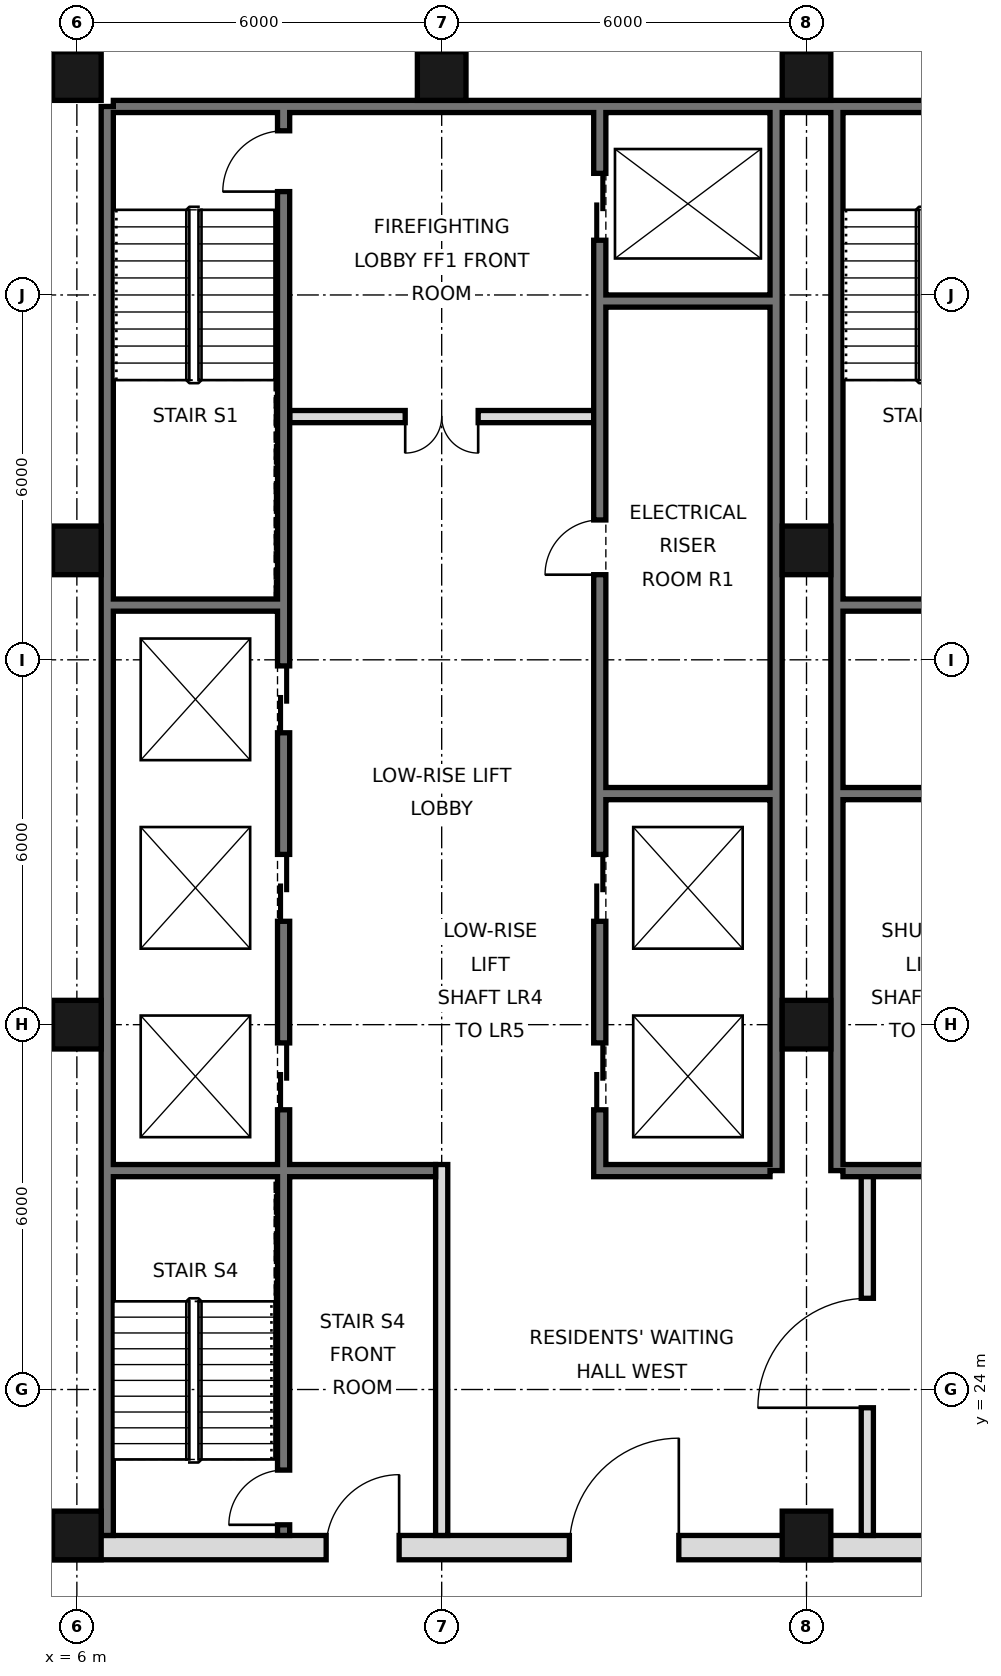
"""IFC4 building model, lengths in metres.
Left out: names, types, materials, properties, quantities, classifications, styles, units other than length and angle.
Written with IfcOpenShell. Run it as: python <this file> out.ifc"""

import sys

from ifc_helpers import new_model, si_unit, direction, frame, frame_2d, origin, origin_2d, place, context, subcontext, project, spatial, rectangle, hollow_rectangle, extrude, element, fill, save


model = new_model("IFC4")
c1 = context("Model", 3, precision=1e-05, world=origin(), true_north=direction((0.0, 1.0)))
c2 = subcontext(c1, "Body", "Model", "MODEL_VIEW")
j1 = project(units=[si_unit("LENGTHUNIT", "METRE"), si_unit("PLANEANGLEUNIT", "RADIAN")], contexts=[c1])
p1 = place(None, origin())
s1 = spatial("IfcSite", under=j1, at=p1, CompositionType="ELEMENT")
p2 = place(p1, origin())
s2 = spatial("IfcBuilding", under=s1, at=p2, CompositionType="ELEMENT")
p3 = place(p2, frame((0.0, 0.0, 99.8)))
s3 = spatial("IfcBuildingStorey", under=s2, at=p3, CompositionType="ELEMENT", Elevation=99.8)
for number, where, z_axis, x_axis in (
    (1, (6.0, 21.6, 0.0), (0.0, 0.0, 1.0), (1.0, 0.0, 0.0)),
    (2, (6.0, 30.0, 0.0), (0.0, 0.0, 1.0), (1.0, 0.0, 0.0)),
    (3, (6.0, 37.8, 0.0), (0.0, 0.0, 1.0), (1.0, 0.0, 0.0)),
    (4, (6.0, 45.6, 0.0), (0.0, 0.0, 1.0), (1.0, 0.0, 0.0)),
    (5, (12.0, 45.6, 0.0), (0.0, 0.0, 1.0), (1.0, 0.0, 0.0)),
    (6, (18.0, 21.6, 0.0), (0.0, 0.0, 1.0), (1.0, 0.0, 0.0)),
    (7, (18.0, 30.0, 0.0), (0.0, 0.0, 1.0), (1.0, 0.0, 0.0)),
    (8, (18.0, 37.8, 0.0), (0.0, 0.0, 1.0), (1.0, 0.0, 0.0)),
    (9, (18.0, 45.6, 0.0), (0.0, 0.0, 1.0), (1.0, 0.0, 0.0)),
):
    element("IfcColumn", number, at=place(p3, frame(where, z_axis=z_axis, x_axis=x_axis)), inside=s3, PredefinedType="COLUMN", context=c2, shape_type="SweptSolid", body=[
        extrude(hollow_rectangle(XDim=0.8, YDim=0.8, WallThickness=0.05, at=origin_2d()), origin(), (0.0, 0.0, 1.0), 3.6),
    ])
p4 = place(p3, frame((6.5, 21.6, 0.0), z_axis=(0.0, 0.0, 1.0), x_axis=(0.0, 1.0, 0.0)))
e10 = element("IfcWall", 10, at=p4, inside=s3, PredefinedType="SOLIDWALL", context=c2, shape_type="SweptSolid", body=[
    extrude(rectangle(XDim=23.5, YDim=0.2, at=frame_2d((11.75, 0.0))), origin(), (0.0, 0.0, 1.0), 3.42),
])
p5 = place(p3, frame((6.6, 45.1, 0.0), z_axis=(0.0, 0.0, 1.0), x_axis=(1.0, 0.0, 0.0)))
e11 = element("IfcWall", 11, at=p5, inside=s3, PredefinedType="SOLIDWALL", context=c2, shape_type="SweptSolid", body=[
    extrude(rectangle(XDim=34.8, YDim=0.2, at=frame_2d((17.4, 0.0))), origin(), (0.0, 0.0, 1.0), 3.42),
])
for number, where, z_axis, x_axis in (
    (12, (17.5, 27.6, 0.0), (0.0, 0.0, 1.0), (0.0, 1.0, 0.0)),
    (13, (18.5, 27.6, 0.0), (0.0, 0.0, 1.0), (0.0, 1.0, 0.0)),
):
    element("IfcWall", number, at=place(p3, frame(where, z_axis=z_axis, x_axis=x_axis)), inside=s3, PredefinedType="SOLIDWALL", context=c2, shape_type="SweptSolid", body=[
        extrude(rectangle(XDim=17.5, YDim=0.2, at=frame_2d((8.75, 0.0))), origin(), (0.0, 0.0, 1.0), 3.42),
    ])
p6 = place(p3, frame((5.6, 21.4, 0.0), z_axis=(0.0, 0.0, 1.0), x_axis=(1.0, 0.0, 0.0)))
e14 = element("IfcWall", 14, at=p6, inside=s3, PredefinedType="SOLIDWALL", context=c2, shape_type="SweptSolid", body=[
    extrude(rectangle(XDim=36.8, YDim=0.4, at=frame_2d((18.4, 0.0))), origin(), (0.0, 0.0, 1.0), 3.42),
])
p7 = place(p6, frame((8.5, 0.0, 0.0)))
e15 = element("IfcOpeningElement", 15, at=p7, cuts=e14, PredefinedType="OPENING", context=c2, shape_type="SweptSolid", body=[
    extrude(rectangle(XDim=1.8, YDim=2.1, at=frame_2d((0.9, 1.05))), frame((0.0, 0.21, 0.0), z_axis=(0.0, -1.0, 0.0), x_axis=(1.0, 0.0, 0.0)), (0.0, 0.0, 1.0), 0.42),
])
p8 = place(p6, frame((17.5, 0.0, 0.0)))
e16 = element("IfcOpeningElement", 16, at=p8, cuts=e14, PredefinedType="OPENING", context=c2, shape_type="SweptSolid", body=[
    extrude(rectangle(XDim=1.8, YDim=2.1, at=frame_2d((0.9, 1.05))), frame((0.0, 0.21, 0.0), z_axis=(0.0, -1.0, 0.0), x_axis=(1.0, 0.0, 0.0)), (0.0, 0.0, 1.0), 0.42),
])
p9 = place(p6, frame((26.5, 0.0, 0.0)))
e17 = element("IfcOpeningElement", 17, at=p9, cuts=e14, PredefinedType="OPENING", context=c2, shape_type="SweptSolid", body=[
    extrude(rectangle(XDim=1.8, YDim=2.1, at=frame_2d((0.9, 1.05))), frame((0.0, 0.21, 0.0), z_axis=(0.0, -1.0, 0.0), x_axis=(1.0, 0.0, 0.0)), (0.0, 0.0, 1.0), 0.42),
])
p10 = place(p6, frame((4.5, 0.0, 0.0)))
e18 = element("IfcOpeningElement", 18, at=p10, cuts=e14, PredefinedType="OPENING", context=c2, shape_type="SweptSolid", body=[
    extrude(rectangle(XDim=1.2, YDim=2.1, at=frame_2d((0.6, 1.05))), frame((0.0, 0.21, 0.0), z_axis=(0.0, -1.0, 0.0), x_axis=(1.0, 0.0, 0.0)), (0.0, 0.0, 1.0), 0.42),
])
p11 = place(p6, frame((31.1, 0.0, 0.0)))
e19 = element("IfcOpeningElement", 19, at=p11, cuts=e14, PredefinedType="OPENING", context=c2, shape_type="SweptSolid", body=[
    extrude(rectangle(XDim=1.2, YDim=2.1, at=frame_2d((0.6, 1.05))), frame((0.0, 0.21, 0.0), z_axis=(0.0, -1.0, 0.0), x_axis=(1.0, 0.0, 0.0)), (0.0, 0.0, 1.0), 0.42),
])
p12 = place(p3, frame((19.0, 21.6, 0.0), z_axis=(0.0, 0.0, 1.0), x_axis=(0.0, 1.0, 0.0)))
e20 = element("IfcWall", 20, at=p12, inside=s3, PredefinedType="PARTITIONING", context=c2, shape_type="SweptSolid", body=[
    extrude(rectangle(XDim=6.0, YDim=0.2, at=frame_2d((3.0, 0.0))), origin(), (0.0, 0.0, 1.0), 3.42),
])
p13 = place(p12, frame((2.1, 0.0, 0.0)))
e21 = element("IfcOpeningElement", 21, at=p13, cuts=e20, PredefinedType="OPENING", context=c2, shape_type="SweptSolid", body=[
    extrude(rectangle(XDim=1.8, YDim=2.1, at=frame_2d((0.9, 1.05))), frame((0.0, 0.11, 0.0), z_axis=(0.0, -1.0, 0.0), x_axis=(1.0, 0.0, 0.0)), (0.0, 0.0, 1.0), 0.22),
])
p14 = place(p3, frame((12.0, 21.6, 0.0), z_axis=(0.0, 0.0, 1.0), x_axis=(0.0, 1.0, 0.0)))
e22 = element("IfcWall", 22, at=p14, inside=s3, PredefinedType="PARTITIONING", context=c2, shape_type="SweptSolid", body=[
    extrude(rectangle(XDim=6.1, YDim=0.2, at=frame_2d((3.05, 0.0))), origin(), (0.0, 0.0, 1.0), 3.42),
])
p15 = place(p3, frame((14.6, 27.5, 0.0), z_axis=(0.0, 0.0, 1.0), x_axis=(0.0, 1.0, 0.0)))
e23 = element("IfcWall", 23, at=p15, inside=s3, PredefinedType="SOLIDWALL", context=c2, shape_type="SweptSolid", body=[
    extrude(rectangle(XDim=17.5, YDim=0.2, at=frame_2d((8.75, 0.0))), origin(), (0.0, 0.0, 1.0), 3.42),
])
p16 = place(p15, frame((1.1, 0.0, 0.0)))
e24 = element("IfcOpeningElement", 24, at=p16, cuts=e23, PredefinedType="OPENING", context=c2, shape_type="SweptSolid", body=[
    extrude(rectangle(XDim=1.1, YDim=2.1, at=frame_2d((0.55, 1.05))), frame((0.0, 0.11, 0.0), z_axis=(0.0, -1.0, 0.0), x_axis=(1.0, 0.0, 0.0)), (0.0, 0.0, 1.0), 0.22),
])
p17 = place(p15, frame((4.2, 0.0, 0.0)))
e25 = element("IfcOpeningElement", 25, at=p17, cuts=e23, PredefinedType="OPENING", context=c2, shape_type="SweptSolid", body=[
    extrude(rectangle(XDim=1.1, YDim=2.1, at=frame_2d((0.55, 1.05))), frame((0.0, 0.11, 0.0), z_axis=(0.0, -1.0, 0.0), x_axis=(1.0, 0.0, 0.0)), (0.0, 0.0, 1.0), 0.22),
])
p18 = place(p15, frame((15.4, 0.0, 0.0)))
e26 = element("IfcOpeningElement", 26, at=p18, cuts=e23, PredefinedType="OPENING", context=c2, shape_type="SweptSolid", body=[
    extrude(rectangle(XDim=1.1, YDim=2.1, at=frame_2d((0.55, 1.05))), frame((0.0, 0.11, 0.0), z_axis=(0.0, -1.0, 0.0), x_axis=(1.0, 0.0, 0.0)), (0.0, 0.0, 1.0), 0.22),
])
p19 = place(p15, frame((9.9, 0.0, 0.0)))
e27 = element("IfcOpeningElement", 27, at=p19, cuts=e23, PredefinedType="OPENING", context=c2, shape_type="SweptSolid", body=[
    extrude(rectangle(XDim=0.9, YDim=2.1, at=frame_2d((0.45, 1.05))), frame((0.0, 0.11, 0.0), z_axis=(0.0, -1.0, 0.0), x_axis=(1.0, 0.0, 0.0)), (0.0, 0.0, 1.0), 0.22),
])
p20 = place(p3, frame((9.4, 21.6, 0.0), z_axis=(0.0, 0.0, 1.0), x_axis=(0.0, 1.0, 0.0)))
e28 = element("IfcWall", 28, at=p20, inside=s3, PredefinedType="SOLIDWALL", context=c2, shape_type="SweptSolid", body=[
    extrude(rectangle(XDim=23.4, YDim=0.2, at=frame_2d((11.7, 0.0))), origin(), (0.0, 0.0, 1.0), 3.42),
])
p21 = place(p20, frame((7.0, 0.0, 0.0)))
e29 = element("IfcOpeningElement", 29, at=p21, cuts=e28, PredefinedType="OPENING", context=c2, shape_type="SweptSolid", body=[
    extrude(rectangle(XDim=1.1, YDim=2.1, at=frame_2d((0.55, 1.05))), frame((0.0, 0.11, 0.0), z_axis=(0.0, -1.0, 0.0), x_axis=(1.0, 0.0, 0.0)), (0.0, 0.0, 1.0), 0.22),
])
p22 = place(p20, frame((10.1, 0.0, 0.0)))
e30 = element("IfcOpeningElement", 30, at=p22, cuts=e28, PredefinedType="OPENING", context=c2, shape_type="SweptSolid", body=[
    extrude(rectangle(XDim=1.1, YDim=2.1, at=frame_2d((0.55, 1.05))), frame((0.0, 0.11, 0.0), z_axis=(0.0, -1.0, 0.0), x_axis=(1.0, 0.0, 0.0)), (0.0, 0.0, 1.0), 0.22),
])
p23 = place(p20, frame((13.2, 0.0, 0.0)))
e31 = element("IfcOpeningElement", 31, at=p23, cuts=e28, PredefinedType="OPENING", context=c2, shape_type="SweptSolid", body=[
    extrude(rectangle(XDim=1.1, YDim=2.1, at=frame_2d((0.55, 1.05))), frame((0.0, 0.11, 0.0), z_axis=(0.0, -1.0, 0.0), x_axis=(1.0, 0.0, 0.0)), (0.0, 0.0, 1.0), 0.22),
])
p24 = place(p20, frame((22.1, 0.0, 0.0)))
e32 = element("IfcOpeningElement", 32, at=p24, cuts=e28, PredefinedType="OPENING", context=c2, shape_type="SweptSolid", body=[
    extrude(rectangle(XDim=1.0, YDim=2.1, at=frame_2d((0.5, 1.05))), frame((0.0, 0.11, 0.0), z_axis=(0.0, -1.0, 0.0), x_axis=(1.0, 0.0, 0.0)), (0.0, 0.0, 1.0), 0.22),
])
p25 = place(p20, frame((0.175, 0.0, 0.0)))
e33 = element("IfcOpeningElement", 33, at=p25, cuts=e28, PredefinedType="OPENING", context=c2, shape_type="SweptSolid", body=[
    extrude(rectangle(XDim=0.9, YDim=2.1, at=frame_2d((0.45, 1.05))), frame((0.0, 0.11, 0.0), z_axis=(0.0, -1.0, 0.0), x_axis=(1.0, 0.0, 0.0)), (0.0, 0.0, 1.0), 0.22),
])
for number, where, z_axis, x_axis in (
    (34, (14.7, 27.6, 0.0), (0.0, 0.0, 1.0), (1.0, 0.0, 0.0)),
    (35, (18.6, 27.6, 0.0), (0.0, 0.0, 1.0), (1.0, 0.0, 0.0)),
):
    element("IfcWall", number, at=place(p3, frame(where, z_axis=z_axis, x_axis=x_axis)), inside=s3, PredefinedType="SOLIDWALL", context=c2, shape_type="SweptSolid", body=[
        extrude(rectangle(XDim=2.7, YDim=0.2, at=frame_2d((1.35, 0.0))), origin(), (0.0, 0.0, 1.0), 3.42),
    ])
p26 = place(p3, frame((6.6, 27.6, 0.0), z_axis=(0.0, 0.0, 1.0), x_axis=(1.0, 0.0, 0.0)))
e36 = element("IfcWall", 36, at=p26, inside=s3, PredefinedType="SOLIDWALL", context=c2, shape_type="SweptSolid", body=[
    extrude(rectangle(XDim=5.3, YDim=0.2, at=frame_2d((2.65, 0.0))), origin(), (0.0, 0.0, 1.0), 3.42),
])
for number, where, z_axis, x_axis in (
    (37, (14.7, 33.8, 0.0), (0.0, 0.0, 1.0), (1.0, 0.0, 0.0)),
    (38, (18.6, 33.8, 0.0), (0.0, 0.0, 1.0), (1.0, 0.0, 0.0)),
    (39, (18.6, 36.9, 0.0), (0.0, 0.0, 1.0), (1.0, 0.0, 0.0)),
    (40, (6.6, 36.9, 0.0), (0.0, 0.0, 1.0), (1.0, 0.0, 0.0)),
):
    element("IfcWall", number, at=place(p3, frame(where, z_axis=z_axis, x_axis=x_axis)), inside=s3, PredefinedType="SOLIDWALL", context=c2, shape_type="SweptSolid", body=[
        extrude(rectangle(XDim=2.7, YDim=0.2, at=frame_2d((1.35, 0.0))), origin(), (0.0, 0.0, 1.0), 3.42),
    ])
p27 = place(p3, frame((9.5, 40.0, 0.0), z_axis=(0.0, 0.0, 1.0), x_axis=(1.0, 0.0, 0.0)))
e41 = element("IfcWall", 41, at=p27, inside=s3, PredefinedType="PARTITIONING", context=c2, shape_type="SweptSolid", body=[
    extrude(rectangle(XDim=5.0, YDim=0.2, at=frame_2d((2.5, 0.0))), origin(), (0.0, 0.0, 1.0), 3.42),
])
p28 = place(p27, frame((1.9, 0.0, 0.0)))
e42 = element("IfcOpeningElement", 42, at=p28, cuts=e41, PredefinedType="OPENING", context=c2, shape_type="SweptSolid", body=[
    extrude(rectangle(XDim=1.2, YDim=2.1, at=frame_2d((0.6, 1.05))), frame((0.0, 0.11, 0.0), z_axis=(0.0, -1.0, 0.0), x_axis=(1.0, 0.0, 0.0)), (0.0, 0.0, 1.0), 0.22),
])
p29 = place(p3, frame((14.7, 41.9, 0.0), z_axis=(0.0, 0.0, 1.0), x_axis=(1.0, 0.0, 0.0)))
e43 = element("IfcWall", 43, at=p29, inside=s3, PredefinedType="SOLIDWALL", context=c2, shape_type="SweptSolid", body=[
    extrude(rectangle(XDim=2.7, YDim=0.2, at=frame_2d((1.35, 0.0))), origin(), (0.0, 0.0, 1.0), 3.42),
])
p30 = place(p7, frame((1.8, 0.0, 0.0), z_axis=(0.0, 0.0, 1.0), x_axis=(-1.0, 0.0, 0.0)))
e44 = element("IfcDoor", 44, at=p30, inside=s3, OperationType="SINGLE_SWING_LEFT", PredefinedType="DOOR", context=c2, shape_type="SweptSolid", body=[
    extrude(rectangle(XDim=1.8, YDim=2.1, at=frame_2d((0.9, 1.05))), frame((0.0, 0.025, 0.0), z_axis=(0.0, -1.0, 0.0), x_axis=(1.0, 0.0, 0.0)), (0.0, 0.0, 1.0), 0.05),
])
fill(e15, e44)
p31 = place(p13, origin())
e45 = element("IfcDoor", 45, at=p31, inside=s3, OperationType="SINGLE_SWING_LEFT", PredefinedType="DOOR", context=c2, shape_type="SweptSolid", body=[
    extrude(rectangle(XDim=1.8, YDim=2.1, at=frame_2d((0.9, 1.05))), frame((0.0, 0.025, 0.0), z_axis=(0.0, -1.0, 0.0), x_axis=(1.0, 0.0, 0.0)), (0.0, 0.0, 1.0), 0.05),
])
fill(e21, e45)
p32 = place(p10, frame((1.2, 0.0, 0.0), z_axis=(0.0, 0.0, 1.0), x_axis=(-1.0, 0.0, 0.0)))
e46 = element("IfcDoor", 46, at=p32, inside=s3, OperationType="SINGLE_SWING_LEFT", PredefinedType="DOOR", context=c2, shape_type="SweptSolid", body=[
    extrude(rectangle(XDim=1.2, YDim=2.1, at=frame_2d((0.6, 1.05))), frame((0.0, 0.025, 0.0), z_axis=(0.0, -1.0, 0.0), x_axis=(1.0, 0.0, 0.0)), (0.0, 0.0, 1.0), 0.05),
])
fill(e18, e46)
p33 = place(p28, frame((1.2, 0.0, 0.0), z_axis=(0.0, 0.0, 1.0), x_axis=(-1.0, 0.0, 0.0)))
e47 = element("IfcDoor", 47, at=p33, inside=s3, OperationType="DOUBLE_DOOR_SINGLE_SWING", PredefinedType="DOOR", context=c2, shape_type="SweptSolid", body=[
    extrude(rectangle(XDim=1.2, YDim=2.1, at=frame_2d((0.6, 1.05))), frame((0.0, 0.025, 0.0), z_axis=(0.0, -1.0, 0.0), x_axis=(1.0, 0.0, 0.0)), (0.0, 0.0, 1.0), 0.05),
])
fill(e42, e47)
p34 = place(p16, origin())
e48 = element("IfcDoor", 48, at=p34, inside=s3, OperationType="DOUBLE_DOOR_SLIDING", PredefinedType="DOOR", context=c2, shape_type="SweptSolid", body=[
    extrude(rectangle(XDim=1.1, YDim=2.1, at=frame_2d((0.55, 1.05))), frame((0.0, 0.025, 0.0), z_axis=(0.0, -1.0, 0.0), x_axis=(1.0, 0.0, 0.0)), (0.0, 0.0, 1.0), 0.05),
])
fill(e24, e48)
p35 = place(p17, origin())
e49 = element("IfcDoor", 49, at=p35, inside=s3, OperationType="DOUBLE_DOOR_SLIDING", PredefinedType="DOOR", context=c2, shape_type="SweptSolid", body=[
    extrude(rectangle(XDim=1.1, YDim=2.1, at=frame_2d((0.55, 1.05))), frame((0.0, 0.025, 0.0), z_axis=(0.0, -1.0, 0.0), x_axis=(1.0, 0.0, 0.0)), (0.0, 0.0, 1.0), 0.05),
])
fill(e25, e49)
p36 = place(p18, origin())
e50 = element("IfcDoor", 50, at=p36, inside=s3, OperationType="DOUBLE_DOOR_SLIDING", PredefinedType="DOOR", context=c2, shape_type="SweptSolid", body=[
    extrude(rectangle(XDim=1.1, YDim=2.1, at=frame_2d((0.55, 1.05))), frame((0.0, 0.025, 0.0), z_axis=(0.0, -1.0, 0.0), x_axis=(1.0, 0.0, 0.0)), (0.0, 0.0, 1.0), 0.05),
])
fill(e26, e50)
p37 = place(p21, origin())
e51 = element("IfcDoor", 51, at=p37, inside=s3, OperationType="DOUBLE_DOOR_SLIDING", PredefinedType="DOOR", context=c2, shape_type="SweptSolid", body=[
    extrude(rectangle(XDim=1.1, YDim=2.1, at=frame_2d((0.55, 1.05))), frame((0.0, 0.025, 0.0), z_axis=(0.0, -1.0, 0.0), x_axis=(1.0, 0.0, 0.0)), (0.0, 0.0, 1.0), 0.05),
])
fill(e29, e51)
p38 = place(p22, origin())
e52 = element("IfcDoor", 52, at=p38, inside=s3, OperationType="DOUBLE_DOOR_SLIDING", PredefinedType="DOOR", context=c2, shape_type="SweptSolid", body=[
    extrude(rectangle(XDim=1.1, YDim=2.1, at=frame_2d((0.55, 1.05))), frame((0.0, 0.025, 0.0), z_axis=(0.0, -1.0, 0.0), x_axis=(1.0, 0.0, 0.0)), (0.0, 0.0, 1.0), 0.05),
])
fill(e30, e52)
p39 = place(p23, origin())
e53 = element("IfcDoor", 53, at=p39, inside=s3, OperationType="DOUBLE_DOOR_SLIDING", PredefinedType="DOOR", context=c2, shape_type="SweptSolid", body=[
    extrude(rectangle(XDim=1.1, YDim=2.1, at=frame_2d((0.55, 1.05))), frame((0.0, 0.025, 0.0), z_axis=(0.0, -1.0, 0.0), x_axis=(1.0, 0.0, 0.0)), (0.0, 0.0, 1.0), 0.05),
])
fill(e31, e53)
p40 = place(p24, origin())
e54 = element("IfcDoor", 54, at=p40, inside=s3, OperationType="SINGLE_SWING_LEFT", PredefinedType="DOOR", context=c2, shape_type="SweptSolid", body=[
    extrude(rectangle(XDim=1.0, YDim=2.1, at=frame_2d((0.5, 1.05))), frame((0.0, 0.025, 0.0), z_axis=(0.0, -1.0, 0.0), x_axis=(1.0, 0.0, 0.0)), (0.0, 0.0, 1.0), 0.05),
])
fill(e32, e54)
p41 = place(p25, origin())
e55 = element("IfcDoor", 55, at=p41, inside=s3, OperationType="SINGLE_SWING_LEFT", PredefinedType="DOOR", context=c2, shape_type="SweptSolid", body=[
    extrude(rectangle(XDim=0.9, YDim=2.1, at=frame_2d((0.45, 1.05))), frame((0.0, 0.025, 0.0), z_axis=(0.0, -1.0, 0.0), x_axis=(1.0, 0.0, 0.0)), (0.0, 0.0, 1.0), 0.05),
])
fill(e33, e55)
p42 = place(p19, origin())
e56 = element("IfcDoor", 56, at=p42, inside=s3, OperationType="SINGLE_SWING_LEFT", PredefinedType="DOOR", context=c2, shape_type="SweptSolid", body=[
    extrude(rectangle(XDim=0.9, YDim=2.1, at=frame_2d((0.45, 1.05))), frame((0.0, 0.025, 0.0), z_axis=(0.0, -1.0, 0.0), x_axis=(1.0, 0.0, 0.0)), (0.0, 0.0, 1.0), 0.05),
])
fill(e27, e56)
save(model, sys.argv[1])
